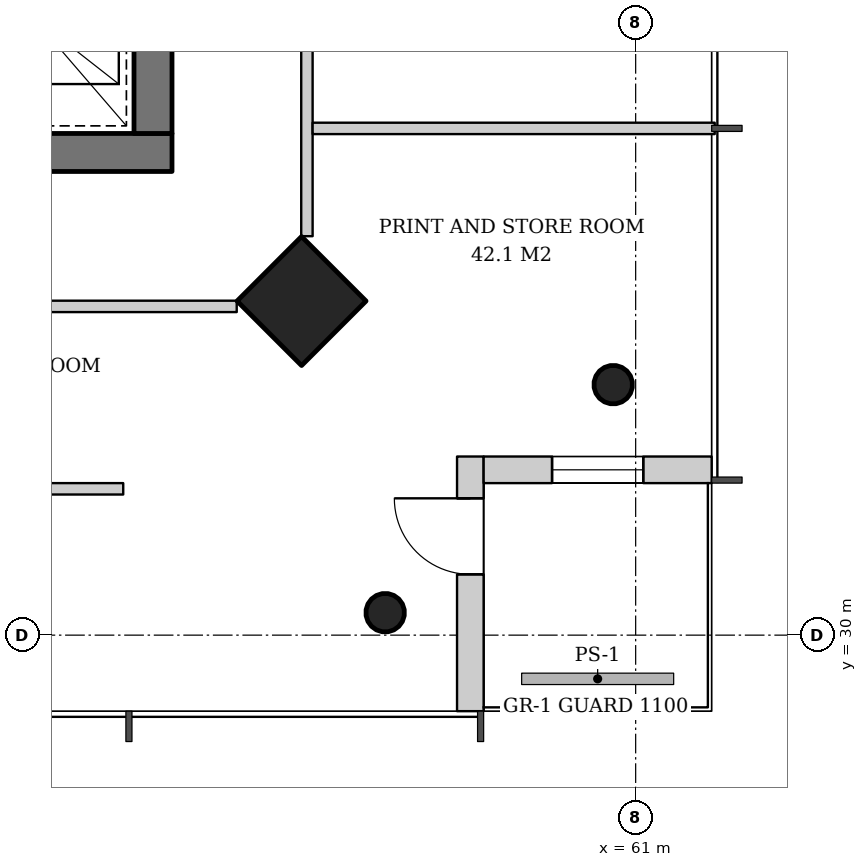
"""IFC4 building model, lengths in metres.
Left out: names, types, materials, properties, quantities, classifications, styles, units other than length and angle.
Written with IfcOpenShell. Run it as: python <this file> out.ifc"""

import sys

from ifc_helpers import new_model, si_unit, direction, frame, frame_2d, origin, origin_2d, place, context, subcontext, project, spatial, rectangle, hollow_circle, extrude, element, fill, save


model = new_model("IFC4")
c1 = context("Model", 3, precision=1e-05, world=origin(), true_north=direction((0.0, 1.0)))
c2 = subcontext(c1, "Body", "Model", "MODEL_VIEW")
j1 = project(units=[si_unit("LENGTHUNIT", "METRE"), si_unit("PLANEANGLEUNIT", "RADIAN")], contexts=[c1])
p1 = place(None, origin())
s1 = spatial("IfcSite", under=j1, at=p1, CompositionType="ELEMENT")
p2 = place(p1, origin())
s2 = spatial("IfcBuilding", under=s1, at=p2, CompositionType="ELEMENT")
p3 = place(p2, frame((0.0, 0.0, 279.4)))
s3 = spatial("IfcBuildingStorey", under=s2, at=p3, CompositionType="ELEMENT", Elevation=279.4)
p4 = place(p3, frame((60.743, 33.257, 0.0), z_axis=(-0.031962158256, 0.031962158256, 0.998977898093), x_axis=(-0.707106781187, -0.707106781187, 0.0)))
e1 = element("IfcColumn", 1, at=p4, inside=s3, PredefinedType="COLUMN", context=c2, shape_type="SweptSolid", body=[
    extrude(hollow_circle(Radius=0.254, WallThickness=0.02, at=origin_2d()), origin(), (0.0, 0.0, 1.0), 3.804),
])
p5 = place(p3, frame((56.643, 34.357, 0.0), z_axis=(-0.031898107953, 0.031898107953, 0.998981992539), x_axis=(-0.707106781187, -0.707106781187, 0.0)))
e2 = element("IfcColumn", 2, at=p5, inside=s3, PredefinedType="COLUMN", context=c2, shape_type="SweptSolid", body=[
    extrude(rectangle(XDim=1.2, YDim=1.2, at=origin_2d()), origin(), (0.0, 0.0, 1.0), 3.804),
])
p6 = place(p3, frame((57.743, 30.257, 0.0), z_axis=(-0.031962158256, 0.031962158256, 0.998977898093), x_axis=(-0.707106781187, -0.707106781187, 0.0)))
e3 = element("IfcColumn", 3, at=p6, inside=s3, PredefinedType="COLUMN", context=c2, shape_type="SweptSolid", body=[
    extrude(hollow_circle(Radius=0.254, WallThickness=0.02, at=origin_2d()), origin(), (0.0, 0.0, 1.0), 3.804),
])
p7 = place(p3, frame((35.1, 36.35, 0.0), z_axis=(0.0, 0.0, 1.0), x_axis=(1.0, 0.0, 0.0)))
e4 = element("IfcWall", 4, at=p7, inside=s3, PredefinedType="SHEAR", context=c2, shape_type="SweptSolid", body=[
    extrude(rectangle(XDim=19.8, YDim=0.5, at=frame_2d((9.9, 0.0))), origin(), (0.0, 0.0, 1.0), 3.8),
])
p8 = place(p7, frame((3.9, 0.0, 0.0)))
e5 = element("IfcOpeningElement", 5, at=p8, cuts=e4, PredefinedType="OPENING", context=c2, shape_type="SweptSolid", body=[
    extrude(rectangle(XDim=1.0, YDim=2.1, at=frame_2d((0.5, 1.05))), frame((0.0, 0.26, 0.0), z_axis=(0.0, -1.0, 0.0), x_axis=(1.0, 0.0, 0.0)), (0.0, 0.0, 1.0), 0.52),
])
p9 = place(p7, frame((15.35, 0.0, 0.0)))
e6 = element("IfcOpeningElement", 6, at=p9, cuts=e4, PredefinedType="OPENING", context=c2, shape_type="SweptSolid", body=[
    extrude(rectangle(XDim=1.0, YDim=2.1, at=frame_2d((0.5, 1.05))), frame((0.0, 0.26, 0.0), z_axis=(0.0, -1.0, 0.0), x_axis=(1.0, 0.0, 0.0)), (0.0, 0.0, 1.0), 0.52),
])
p10 = place(p3, frame((54.65, 36.6, 0.0), z_axis=(0.0, 0.0, 1.0), x_axis=(0.0, 1.0, 0.0)))
e7 = element("IfcWall", 7, at=p10, inside=s3, PredefinedType="SHEAR", context=c2, shape_type="SweptSolid", body=[
    extrude(rectangle(XDim=18.8, YDim=0.5, at=frame_2d((9.4, 0.0))), origin(), (0.0, 0.0, 1.0), 3.8),
])
p11 = place(p10, frame((8.5, 0.0, 0.0)))
e8 = element("IfcOpeningElement", 8, at=p11, cuts=e7, PredefinedType="OPENING", context=c2, shape_type="SweptSolid", body=[
    extrude(rectangle(XDim=1.8, YDim=2.4, at=frame_2d((0.9, 1.2))), frame((0.0, 0.26, 0.0), z_axis=(0.0, -1.0, 0.0), x_axis=(1.0, 0.0, 0.0)), (0.0, 0.0, 1.0), 0.52),
])
p12 = place(p3, frame((58.825, 29.0, 0.0), z_axis=(0.0, 0.0, 1.0), x_axis=(0.0, 1.0, 0.0)))
e9 = element("IfcWall", 9, at=p12, inside=s3, PredefinedType="SOLIDWALL", context=c2, shape_type="SweptSolid", body=[
    extrude(rectangle(XDim=3.35, YDim=0.35, at=frame_2d((1.675, 0.0))), origin(), (0.0, 0.0, 1.0), 3.5),
])
p13 = place(p12, frame((1.8, 0.0, 0.0)))
e10 = element("IfcOpeningElement", 10, at=p13, cuts=e9, PredefinedType="OPENING", context=c2, shape_type="SweptSolid", body=[
    extrude(rectangle(XDim=1.0, YDim=2.4, at=frame_2d((0.5, 1.2))), frame((0.0, 0.185, 0.0), z_axis=(0.0, -1.0, 0.0), x_axis=(1.0, 0.0, 0.0)), (0.0, 0.0, 1.0), 0.37),
])
p14 = place(p3, frame((59.0, 32.175, 0.0), z_axis=(0.0, 0.0, 1.0), x_axis=(1.0, 0.0, 0.0)))
e11 = element("IfcWall", 11, at=p14, inside=s3, PredefinedType="SOLIDWALL", context=c2, shape_type="SweptSolid", body=[
    extrude(rectangle(XDim=3.0, YDim=0.35, at=frame_2d((1.5, 0.0))), origin(), (0.0, 0.0, 1.0), 3.5),
])
p15 = place(p14, frame((0.9, 0.0, 0.6)))
e12 = element("IfcOpeningElement", 12, at=p15, cuts=e11, PredefinedType="OPENING", context=c2, shape_type="SweptSolid", body=[
    extrude(rectangle(XDim=1.2, YDim=2.55, at=frame_2d((0.6, 1.275))), frame((0.0, 0.185, 0.0), z_axis=(0.0, -1.0, 0.0), x_axis=(1.0, 0.0, 0.0)), (0.0, 0.0, 1.0), 0.37),
])
p16 = place(p3, frame((56.675, 35.249, 0.0), z_axis=(0.0, 0.0, 1.0), x_axis=(0.0, 1.0, 0.0)))
e13 = element("IfcWall", 13, at=p16, inside=s3, PredefinedType="PARTITIONING", context=c2, shape_type="SweptSolid", body=[
    extrude(rectangle(XDim=21.503, YDim=0.15, at=frame_2d((10.751, 0.0))), origin(), (0.0, 0.0, 1.0), 2.747),
])
p17 = place(p16, frame((3.251, 0.0, 0.0)))
e14 = element("IfcOpeningElement", 14, at=p17, cuts=e13, PredefinedType="OPENING", context=c2, shape_type="SweptSolid", body=[
    extrude(rectangle(XDim=1.0, YDim=2.1, at=frame_2d((0.5, 1.05))), frame((0.0, 0.085, 0.0), z_axis=(0.0, -1.0, 0.0), x_axis=(1.0, 0.0, 0.0)), (0.0, 0.0, 1.0), 0.17),
])
p18 = place(p16, frame((7.918, 0.0, 0.0)))
e15 = element("IfcOpeningElement", 15, at=p18, cuts=e13, PredefinedType="OPENING", context=c2, shape_type="SweptSolid", body=[
    extrude(rectangle(XDim=1.0, YDim=2.1, at=frame_2d((0.5, 1.05))), frame((0.0, 0.085, 0.0), z_axis=(0.0, -1.0, 0.0), x_axis=(1.0, 0.0, 0.0)), (0.0, 0.0, 1.0), 0.17),
])
p19 = place(p16, frame((12.585, 0.0, 0.0)))
e16 = element("IfcOpeningElement", 16, at=p19, cuts=e13, PredefinedType="OPENING", context=c2, shape_type="SweptSolid", body=[
    extrude(rectangle(XDim=1.0, YDim=2.1, at=frame_2d((0.5, 1.05))), frame((0.0, 0.085, 0.0), z_axis=(0.0, -1.0, 0.0), x_axis=(1.0, 0.0, 0.0)), (0.0, 0.0, 1.0), 0.17),
])
p20 = place(p16, frame((17.251, 0.0, 0.0)))
e17 = element("IfcOpeningElement", 17, at=p20, cuts=e13, PredefinedType="OPENING", context=c2, shape_type="SweptSolid", body=[
    extrude(rectangle(XDim=1.0, YDim=2.1, at=frame_2d((0.5, 1.05))), frame((0.0, 0.085, 0.0), z_axis=(0.0, -1.0, 0.0), x_axis=(1.0, 0.0, 0.0)), (0.0, 0.0, 1.0), 0.17),
])
p21 = place(p3, frame((56.75, 36.667, 0.0), z_axis=(0.0, 0.0, 1.0), x_axis=(1.0, 0.0, 0.0)))
e18 = element("IfcWall", 18, at=p21, inside=s3, PredefinedType="PARTITIONING", context=c2, shape_type="SweptSolid", body=[
    extrude(rectangle(XDim=5.29, YDim=0.15, at=frame_2d((2.645, 0.0))), origin(), (0.0, 0.0, 1.0), 3.0),
])
p22 = place(p3, frame((49.742, 31.925, 0.0), z_axis=(0.0, 0.0, 1.0), x_axis=(1.0, 0.0, 0.0)))
e19 = element("IfcWall", 19, at=p22, inside=s3, PredefinedType="PARTITIONING", context=c2, shape_type="SweptSolid", body=[
    extrude(rectangle(XDim=4.517, YDim=0.15, at=frame_2d((2.258, 0.0))), origin(), (0.0, 0.0, 1.0), 2.747),
])
p23 = place(p3, frame((34.249, 34.325, 0.0), z_axis=(0.0, 0.0, 1.0), x_axis=(1.0, 0.0, 0.0)))
e20 = element("IfcWall", 20, at=p23, inside=s3, PredefinedType="PARTITIONING", context=c2, shape_type="SweptSolid", body=[
    extrude(rectangle(XDim=21.503, YDim=0.15, at=frame_2d((10.751, 0.0))), origin(), (0.0, 0.0, 1.0), 2.747),
])
p24 = place(p23, frame((3.251, 0.0, 0.0)))
e21 = element("IfcOpeningElement", 21, at=p24, cuts=e20, PredefinedType="OPENING", context=c2, shape_type="SweptSolid", body=[
    extrude(rectangle(XDim=1.0, YDim=2.1, at=frame_2d((0.5, 1.05))), frame((0.0, 0.085, 0.0), z_axis=(0.0, -1.0, 0.0), x_axis=(1.0, 0.0, 0.0)), (0.0, 0.0, 1.0), 0.17),
])
p25 = place(p23, frame((7.918, 0.0, 0.0)))
e22 = element("IfcOpeningElement", 22, at=p25, cuts=e20, PredefinedType="OPENING", context=c2, shape_type="SweptSolid", body=[
    extrude(rectangle(XDim=1.0, YDim=2.1, at=frame_2d((0.5, 1.05))), frame((0.0, 0.085, 0.0), z_axis=(0.0, -1.0, 0.0), x_axis=(1.0, 0.0, 0.0)), (0.0, 0.0, 1.0), 0.17),
])
p26 = place(p23, frame((12.585, 0.0, 0.0)))
e23 = element("IfcOpeningElement", 23, at=p26, cuts=e20, PredefinedType="OPENING", context=c2, shape_type="SweptSolid", body=[
    extrude(rectangle(XDim=1.0, YDim=2.1, at=frame_2d((0.5, 1.05))), frame((0.0, 0.085, 0.0), z_axis=(0.0, -1.0, 0.0), x_axis=(1.0, 0.0, 0.0)), (0.0, 0.0, 1.0), 0.17),
])
p27 = place(p23, frame((17.251, 0.0, 0.0)))
e24 = element("IfcOpeningElement", 24, at=p27, cuts=e20, PredefinedType="OPENING", context=c2, shape_type="SweptSolid", body=[
    extrude(rectangle(XDim=1.0, YDim=2.1, at=frame_2d((0.5, 1.05))), frame((0.0, 0.085, 0.0), z_axis=(0.0, -1.0, 0.0), x_axis=(1.0, 0.0, 0.0)), (0.0, 0.0, 1.0), 0.17),
])
p28 = place(p13, origin())
e25 = element("IfcDoor", 25, at=p28, inside=s3, OperationType="SINGLE_SWING_RIGHT", PredefinedType="DOOR", context=c2, shape_type="SweptSolid", body=[
    extrude(rectangle(XDim=1.0, YDim=2.4, at=frame_2d((0.5, 1.2))), frame((0.0, 0.025, 0.0), z_axis=(0.0, -1.0, 0.0), x_axis=(1.0, 0.0, 0.0)), (0.0, 0.0, 1.0), 0.05),
])
fill(e10, e25)
p29 = place(p15, origin())
e26 = element("IfcWindow", 26, at=p29, inside=s3, PartitioningType="SINGLE_PANEL", PredefinedType="WINDOW", context=c2, shape_type="SweptSolid", body=[
    extrude(rectangle(XDim=1.2, YDim=2.55, at=frame_2d((0.6, 1.275))), frame((0.0, 0.03, 0.0), z_axis=(0.0, -1.0, 0.0), x_axis=(1.0, 0.0, 0.0)), (0.0, 0.0, 1.0), 0.06),
])
fill(e12, e26)
save(model, sys.argv[1])
